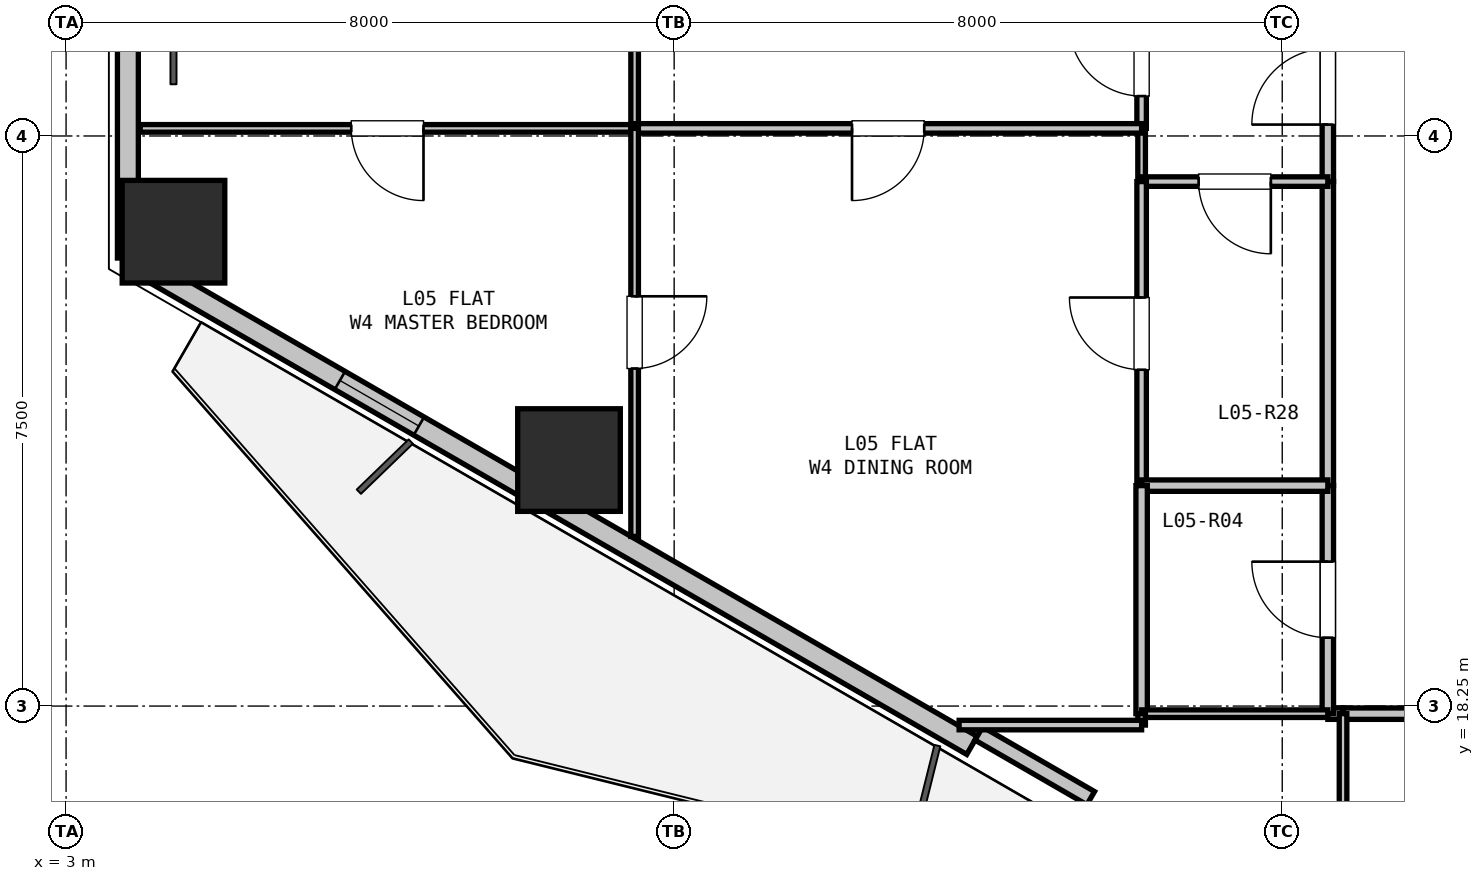
"""IFC4 building model, lengths in metres.
Left out: names, types, materials, properties, quantities, classifications, styles, units other than length and angle.
Written with IfcOpenShell. Run it as: python <this file> out.ifc"""

import sys

from ifc_helpers import new_model, si_unit, direction, frame, frame_2d, origin, origin_2d, place, context, subcontext, project, spatial, rectangle, hollow_rectangle, extrude, element, fill, save


model = new_model("IFC4")
c1 = context("Model", 3, precision=1e-05, world=origin(), true_north=direction((0.0, 1.0)))
c2 = subcontext(c1, "Body", "Model", "MODEL_VIEW")
j1 = project(units=[si_unit("LENGTHUNIT", "METRE"), si_unit("PLANEANGLEUNIT", "RADIAN")], contexts=[c1])
p1 = place(None, origin())
s1 = spatial("IfcSite", under=j1, at=p1, CompositionType="ELEMENT")
p2 = place(p1, origin())
s2 = spatial("IfcBuilding", under=s1, at=p2, CompositionType="ELEMENT")
p3 = place(p2, frame((0.0, 0.0, 22.5)))
s3 = spatial("IfcBuildingStorey", under=s2, at=p3, CompositionType="ELEMENT", Elevation=22.5)
for number, where, z_axis, x_axis in (
    (1, (9.617, 21.486, 0.0), (0.0, 0.0, 1.0), (1.0, 0.0, 0.0)),
    (2, (4.413, 24.491, 0.0), (0.0, 0.0, 1.0), (1.0, 0.0, 0.0)),
):
    element("IfcColumn", number, at=place(p3, frame(where, z_axis=z_axis, x_axis=x_axis)), inside=s3, PredefinedType="COLUMN", context=c2, shape_type="SweptSolid", body=[
        extrude(hollow_rectangle(XDim=1.35, YDim=1.35, WallThickness=0.036, at=origin_2d()), origin(), (0.0, 0.0, 1.0), 3.3),
    ])
p4 = place(p3, frame((3.813, 24.144, 0.0), z_axis=(0.0, 0.0, 1.0), x_axis=(0.0, 1.0, 0.0)))
e3 = element("IfcWall", 3, at=p4, inside=s3, PredefinedType="SOLIDWALL", context=c2, shape_type="SweptSolid", body=[
    extrude(rectangle(XDim=5.211, YDim=0.275, at=frame_2d((2.606, 0.0))), origin(), (0.0, 0.0, 1.0), 2.66),
])
p5 = place(p3, frame((14.918, 17.733, 0.0), z_axis=(0.0, 0.0, 1.0), x_axis=(-0.866027105532, 0.499997052475, 0.0)))
e4 = element("IfcWall", 4, at=p5, inside=s3, PredefinedType="SOLIDWALL", context=c2, shape_type="SweptSolid", body=[
    extrude(rectangle(XDim=12.673, YDim=0.275, at=frame_2d((6.336, 0.0))), origin(), (0.0, 0.0, 1.0), 2.66),
])
p6 = place(p5, frame((8.402, 0.0, 0.9)))
e5 = element("IfcOpeningElement", 5, at=p6, cuts=e4, PredefinedType="OPENING", context=c2, shape_type="SweptSolid", body=[
    extrude(rectangle(XDim=1.2, YDim=1.4, at=frame_2d((0.6, 0.7))), frame((0.0, 0.147, 0.0), z_axis=(0.0, -1.0, 0.0), x_axis=(1.0, 0.0, 0.0)), (0.0, 0.0, 1.0), 0.295),
])
p7 = place(p3, frame((16.48, 17.039, 0.0), z_axis=(0.0, 0.0, 1.0), x_axis=(-0.86605165483, 0.499954529098, 0.0)))
e6 = element("IfcWall", 6, at=p7, inside=s3, PredefinedType="PARAPET", context=c2, shape_type="SweptSolid", body=[
    extrude(rectangle(XDim=1.7, YDim=0.2, at=frame_2d((0.85, 0.0))), origin(), (0.0, 0.0, 1.0), 2.66),
])
p8 = place(p3, frame((22.6, 18.15, 0.0), z_axis=(0.0, 0.0, 1.0), x_axis=(-1.0, 0.0, 0.0)))
e7 = element("IfcWall", 7, at=p8, inside=s3, PredefinedType="PARTITIONING", context=c2, shape_type="SweptSolid", body=[
    extrude(rectangle(XDim=2.8, YDim=0.15, at=frame_2d((1.4, 0.0))), origin(), (0.0, 0.0, 1.0), 3.04),
])
p9 = place(p8, frame((0.9, 0.0, 0.0)))
e8 = element("IfcOpeningElement", 8, at=p9, cuts=e7, PredefinedType="OPENING", context=c2, shape_type="SweptSolid", body=[
    extrude(rectangle(XDim=1.0, YDim=2.15, at=frame_2d((0.5, 1.075))), frame((0.0, 0.085, 0.0), z_axis=(0.0, -1.0, 0.0), x_axis=(1.0, 0.0, 0.0)), (0.0, 0.0, 1.0), 0.17),
])
p10 = place(p3, frame((19.8, 18.15, 0.0), z_axis=(0.0, 0.0, 1.0), x_axis=(-1.0, 0.0, 0.0)))
e9 = element("IfcWall", 9, at=p10, inside=s3, PredefinedType="PARTITIONING", context=c2, shape_type="SweptSolid", body=[
    extrude(rectangle(XDim=0.2, YDim=0.15, at=frame_2d((0.1, 0.0))), origin(), (0.0, 0.0, 1.0), 3.04),
])
p11 = place(p3, frame((19.6, 18.15, 0.0), z_axis=(0.0, 0.0, 1.0), x_axis=(0.0, 1.0, 0.0)))
e10 = element("IfcWall", 10, at=p11, inside=s3, PredefinedType="PARTITIONING", context=c2, shape_type="SweptSolid", body=[
    extrude(rectangle(XDim=3.0, YDim=0.15, at=frame_2d((1.5, 0.0))), origin(), (0.0, 0.0, 1.0), 2.337),
])
p12 = place(p11, frame((1.0, 0.0, 0.0)))
e11 = element("IfcOpeningElement", 11, at=p12, cuts=e10, PredefinedType="OPENING", context=c2, shape_type="SweptSolid", body=[
    extrude(rectangle(XDim=1.0, YDim=2.15, at=frame_2d((0.5, 1.075))), frame((0.0, 0.085, 0.0), z_axis=(0.0, -1.0, 0.0), x_axis=(1.0, 0.0, 0.0)), (0.0, 0.0, 1.0), 0.17),
])
p13 = place(p3, frame((19.6, 21.15, 0.0), z_axis=(0.0, 0.0, 1.0), x_axis=(0.0, 1.0, 0.0)))
e12 = element("IfcWall", 12, at=p13, inside=s3, PredefinedType="PARTITIONING", context=c2, shape_type="SweptSolid", body=[
    extrude(rectangle(XDim=4.0, YDim=0.15, at=frame_2d((2.0, 0.0))), origin(), (0.0, 0.0, 1.0), 3.04),
])
p14 = place(p3, frame((19.6, 25.15, 0.0), z_axis=(0.0, 0.0, 1.0), x_axis=(0.0, 1.0, 0.0)))
e13 = element("IfcWall", 13, at=p14, inside=s3, PredefinedType="PARTITIONING", context=c2, shape_type="SweptSolid", body=[
    extrude(rectangle(XDim=2.5, YDim=0.15, at=frame_2d((1.25, 0.0))), origin(), (0.0, 0.0, 1.0), 3.04),
])
p15 = place(p14, frame((0.75, 0.0, 0.0)))
e14 = element("IfcOpeningElement", 14, at=p15, cuts=e13, PredefinedType="OPENING", context=c2, shape_type="SweptSolid", body=[
    extrude(rectangle(XDim=1.0, YDim=2.15, at=frame_2d((0.5, 1.075))), frame((0.0, 0.085, 0.0), z_axis=(0.0, -1.0, 0.0), x_axis=(1.0, 0.0, 0.0)), (0.0, 0.0, 1.0), 0.17),
])
p16 = place(p3, frame((17.15, 25.15, 0.0), z_axis=(0.0, 0.0, 1.0), x_axis=(0.0, 1.0, 0.0)))
e15 = element("IfcWall", 15, at=p16, inside=s3, PredefinedType="PARTITIONING", context=c2, shape_type="SweptSolid", body=[
    extrude(rectangle(XDim=0.7, YDim=0.1, at=frame_2d((0.35, 0.0))), origin(), (0.0, 0.0, 1.0), 3.04),
])
p17 = place(p3, frame((17.15, 25.85, 0.0), z_axis=(0.0, 0.0, 1.0), x_axis=(0.0, 1.0, 0.0)))
e16 = element("IfcWall", 16, at=p17, inside=s3, PredefinedType="PARTITIONING", context=c2, shape_type="SweptSolid", body=[
    extrude(rectangle(XDim=1.8, YDim=0.125, at=frame_2d((0.9, 0.0))), origin(), (0.0, 0.0, 1.0), 3.04),
])
p18 = place(p17, frame((0.425, 0.0, 0.0)))
e17 = element("IfcOpeningElement", 17, at=p18, cuts=e16, PredefinedType="OPENING", context=c2, shape_type="SweptSolid", body=[
    extrude(rectangle(XDim=0.95, YDim=2.1, at=frame_2d((0.475, 1.05))), frame((0.0, 0.073, 0.0), z_axis=(0.0, -1.0, 0.0), x_axis=(1.0, 0.0, 0.0)), (0.0, 0.0, 1.0), 0.145),
])
p19 = place(p3, frame((19.6, 25.15, 0.0), z_axis=(0.0, 0.0, 1.0), x_axis=(-1.0, 0.0, 0.0)))
e18 = element("IfcWall", 18, at=p19, inside=s3, PredefinedType="PARTITIONING", context=c2, shape_type="SweptSolid", body=[
    extrude(rectangle(XDim=2.45, YDim=0.125, at=frame_2d((1.225, 0.0))), origin(), (0.0, 0.0, 1.0), 3.04),
])
p20 = place(p19, frame((0.75, 0.0, 0.0)))
e19 = element("IfcOpeningElement", 19, at=p20, cuts=e18, PredefinedType="OPENING", context=c2, shape_type="SweptSolid", body=[
    extrude(rectangle(XDim=0.95, YDim=2.1, at=frame_2d((0.475, 1.05))), frame((0.0, 0.073, 0.0), z_axis=(0.0, -1.0, 0.0), x_axis=(1.0, 0.0, 0.0)), (0.0, 0.0, 1.0), 0.145),
])
p21 = place(p3, frame((17.15, 21.15, 0.0), z_axis=(0.0, 0.0, 1.0), x_axis=(0.0, 1.0, 0.0)))
e20 = element("IfcWall", 20, at=p21, inside=s3, PredefinedType="PARTITIONING", context=c2, shape_type="SweptSolid", body=[
    extrude(rectangle(XDim=4.0, YDim=0.125, at=frame_2d((2.0, 0.0))), origin(), (0.0, 0.0, 1.0), 2.337),
])
p22 = place(p21, frame((1.525, 0.0, 0.0)))
e21 = element("IfcOpeningElement", 21, at=p22, cuts=e20, PredefinedType="OPENING", context=c2, shape_type="SweptSolid", body=[
    extrude(rectangle(XDim=0.95, YDim=2.1, at=frame_2d((0.475, 1.05))), frame((0.0, 0.073, 0.0), z_axis=(0.0, -1.0, 0.0), x_axis=(1.0, 0.0, 0.0)), (0.0, 0.0, 1.0), 0.145),
])
p23 = place(p3, frame((19.6, 21.15, 0.0), z_axis=(0.0, 0.0, 1.0), x_axis=(-1.0, 0.0, 0.0)))
e22 = element("IfcWall", 22, at=p23, inside=s3, PredefinedType="PARTITIONING", context=c2, shape_type="SweptSolid", body=[
    extrude(rectangle(XDim=2.45, YDim=0.15, at=frame_2d((1.225, 0.0))), origin(), (0.0, 0.0, 1.0), 2.337),
])
p24 = place(p3, frame((17.15, 18.15, 0.0), z_axis=(0.0, 0.0, 1.0), x_axis=(0.0, 1.0, 0.0)))
e23 = element("IfcWall", 23, at=p24, inside=s3, PredefinedType="PARTITIONING", context=c2, shape_type="SweptSolid", body=[
    extrude(rectangle(XDim=3.0, YDim=0.15, at=frame_2d((1.5, 0.0))), origin(), (0.0, 0.0, 1.0), 3.04),
])
p25 = place(p3, frame((19.6, 18.15, 0.0), z_axis=(0.0, 0.0, 1.0), x_axis=(-1.0, 0.0, 0.0)))
e24 = element("IfcWall", 24, at=p25, inside=s3, PredefinedType="PARTITIONING", context=c2, shape_type="SweptSolid", body=[
    extrude(rectangle(XDim=2.45, YDim=0.1, at=frame_2d((1.225, 0.0))), origin(), (0.0, 0.0, 1.0), 3.04),
])
p26 = place(p3, frame((19.8, 14.956, 0.0), z_axis=(0.0, 0.0, 1.0), x_axis=(0.0, 1.0, 0.0)))
e25 = element("IfcWall", 25, at=p26, inside=s3, PredefinedType="PARTITIONING", context=c2, shape_type="SweptSolid", body=[
    extrude(rectangle(XDim=3.194, YDim=0.1, at=frame_2d((1.597, 0.0))), origin(), (0.0, 0.0, 1.0), 2.365),
])
p27 = place(p3, frame((10.48, 25.85, 0.0), z_axis=(0.0, 0.0, 1.0), x_axis=(-1.0, 0.0, 0.0)))
e26 = element("IfcWall", 26, at=p27, inside=s3, PredefinedType="PARTITIONING", context=c2, shape_type="SweptSolid", body=[
    extrude(rectangle(XDim=6.505, YDim=0.1, at=frame_2d((3.253, 0.0))), origin(), (0.0, 0.0, 1.0), 2.65),
])
p28 = place(p27, frame((2.778, 0.0, 0.0)))
e27 = element("IfcOpeningElement", 27, at=p28, cuts=e26, PredefinedType="OPENING", context=c2, shape_type="SweptSolid", body=[
    extrude(rectangle(XDim=0.95, YDim=2.1, at=frame_2d((0.475, 1.05))), frame((0.0, 0.06, 0.0), z_axis=(0.0, -1.0, 0.0), x_axis=(1.0, 0.0, 0.0)), (0.0, 0.0, 1.0), 0.12),
])
p29 = place(p3, frame((10.48, 33.018, 0.0), z_axis=(0.0, 0.0, 1.0), x_axis=(0.0, -1.0, 0.0)))
e28 = element("IfcWall", 28, at=p29, inside=s3, PredefinedType="PARTITIONING", context=c2, shape_type="SweptSolid", body=[
    extrude(rectangle(XDim=7.168, YDim=0.1, at=frame_2d((3.584, 0.0))), origin(), (0.0, 0.0, 1.0), 2.337),
])
p30 = place(p29, frame((3.109, 0.0, 0.0)))
e29 = element("IfcOpeningElement", 29, at=p30, cuts=e28, PredefinedType="OPENING", context=c2, shape_type="SweptSolid", body=[
    extrude(rectangle(XDim=0.95, YDim=2.1, at=frame_2d((0.475, 1.05))), frame((0.0, 0.06, 0.0), z_axis=(0.0, -1.0, 0.0), x_axis=(1.0, 0.0, 0.0)), (0.0, 0.0, 1.0), 0.12),
])
p31 = place(p3, frame((17.15, 25.85, 0.0), z_axis=(0.0, 0.0, 1.0), x_axis=(-1.0, 0.0, 0.0)))
e30 = element("IfcWall", 30, at=p31, inside=s3, PredefinedType="PARTITIONING", context=c2, shape_type="SweptSolid", body=[
    extrude(rectangle(XDim=6.67, YDim=0.125, at=frame_2d((3.335, 0.0))), origin(), (0.0, 0.0, 1.0), 3.04),
])
p32 = place(p31, frame((2.86, 0.0, 0.0)))
e31 = element("IfcOpeningElement", 31, at=p32, cuts=e30, PredefinedType="OPENING", context=c2, shape_type="SweptSolid", body=[
    extrude(rectangle(XDim=0.95, YDim=2.1, at=frame_2d((0.475, 1.05))), frame((0.0, 0.073, 0.0), z_axis=(0.0, -1.0, 0.0), x_axis=(1.0, 0.0, 0.0)), (0.0, 0.0, 1.0), 0.145),
])
p33 = place(p3, frame((10.48, 25.85, 0.0), z_axis=(0.0, 0.0, 1.0), x_axis=(0.0, -1.0, 0.0)))
e32 = element("IfcWall", 32, at=p33, inside=s3, PredefinedType="PARTITIONING", context=c2, shape_type="SweptSolid", body=[
    extrude(rectangle(XDim=5.368, YDim=0.1, at=frame_2d((2.684, 0.0))), origin(), (0.0, 0.0, 1.0), 2.337),
])
p34 = place(p33, frame((2.209, 0.0, 0.0)))
e33 = element("IfcOpeningElement", 33, at=p34, cuts=e32, PredefinedType="OPENING", context=c2, shape_type="SweptSolid", body=[
    extrude(rectangle(XDim=0.95, YDim=2.1, at=frame_2d((0.475, 1.05))), frame((0.0, 0.06, 0.0), z_axis=(0.0, -1.0, 0.0), x_axis=(1.0, 0.0, 0.0)), (0.0, 0.0, 1.0), 0.12),
])
p35 = place(p3, frame((3.943, 24.069, 0.0), z_axis=(0.0, 0.0, 1.0), x_axis=(-0.866131372301, 0.499816412211, 0.0)))
e34 = element("IfcWall", 34, at=p35, inside=s3, PredefinedType="PARTITIONING", context=c2, shape_type="SweptSolid", body=[
    extrude(rectangle(XDim=0.15, YDim=0.125, at=frame_2d((0.075, 0.0))), origin(), (0.0, 0.0, 1.0), 3.04),
])
p36 = place(p3, frame((17.15, 18.15, 0.0), z_axis=(0.0, 0.0, 1.0), x_axis=(0.0, -1.0, 0.0)))
e35 = element("IfcWall", 35, at=p36, inside=s3, PredefinedType="PARTITIONING", context=c2, shape_type="SweptSolid", body=[
    extrude(rectangle(XDim=0.15, YDim=0.1, at=frame_2d((0.075, 0.0))), origin(), (0.0, 0.0, 1.0), 3.04),
])
p37 = place(p3, frame((17.15, 18.0, 0.0), z_axis=(0.0, 0.0, 1.0), x_axis=(-1.0, 0.0, 0.0)))
e36 = element("IfcWall", 36, at=p37, inside=s3, PredefinedType="PARTITIONING", context=c2, shape_type="SweptSolid", body=[
    extrude(rectangle(XDim=2.401, YDim=0.125, at=frame_2d((1.2, 0.0))), origin(), (0.0, 0.0, 1.0), 2.365),
])
p38 = place(p6, origin())
e37 = element("IfcWindow", 37, at=p38, inside=s3, PartitioningType="SINGLE_PANEL", PredefinedType="WINDOW", context=c2, shape_type="SweptSolid", body=[
    extrude(rectangle(XDim=1.2, YDim=1.4, at=frame_2d((0.6, 0.7))), frame((0.0, 0.03, 0.0), z_axis=(0.0, -1.0, 0.0), x_axis=(1.0, 0.0, 0.0)), (0.0, 0.0, 1.0), 0.06),
])
fill(e5, e37)
p39 = place(p15, origin())
e38 = element("IfcDoor", 38, at=p39, inside=s3, OperationType="SINGLE_SWING_LEFT", PredefinedType="DOOR", context=c2, shape_type="SweptSolid", body=[
    extrude(rectangle(XDim=1.0, YDim=2.15, at=frame_2d((0.5, 1.075))), frame((0.0, 0.025, 0.0), z_axis=(0.0, -1.0, 0.0), x_axis=(1.0, 0.0, 0.0)), (0.0, 0.0, 1.0), 0.05),
])
fill(e14, e38)
p40 = place(p12, origin())
e39 = element("IfcDoor", 39, at=p40, inside=s3, OperationType="SINGLE_SWING_RIGHT", PredefinedType="DOOR", context=c2, shape_type="SweptSolid", body=[
    extrude(rectangle(XDim=1.0, YDim=2.15, at=frame_2d((0.5, 1.075))), frame((0.0, 0.025, 0.0), z_axis=(0.0, -1.0, 0.0), x_axis=(1.0, 0.0, 0.0)), (0.0, 0.0, 1.0), 0.05),
])
fill(e11, e39)
p41 = place(p20, origin())
e40 = element("IfcDoor", 40, at=p41, inside=s3, OperationType="SINGLE_SWING_LEFT", PredefinedType="DOOR", context=c2, shape_type="SweptSolid", body=[
    extrude(rectangle(XDim=0.95, YDim=2.1, at=frame_2d((0.475, 1.05))), frame((0.0, 0.025, 0.0), z_axis=(0.0, -1.0, 0.0), x_axis=(1.0, 0.0, 0.0)), (0.0, 0.0, 1.0), 0.05),
])
fill(e19, e40)
p42 = place(p18, origin())
e41 = element("IfcDoor", 41, at=p42, inside=s3, OperationType="SINGLE_SWING_RIGHT", PredefinedType="DOOR", context=c2, shape_type="SweptSolid", body=[
    extrude(rectangle(XDim=0.95, YDim=2.1, at=frame_2d((0.475, 1.05))), frame((0.0, 0.025, 0.0), z_axis=(0.0, -1.0, 0.0), x_axis=(1.0, 0.0, 0.0)), (0.0, 0.0, 1.0), 0.05),
])
fill(e17, e41)
p43 = place(p22, origin())
e42 = element("IfcDoor", 42, at=p43, inside=s3, OperationType="SINGLE_SWING_RIGHT", PredefinedType="DOOR", context=c2, shape_type="SweptSolid", body=[
    extrude(rectangle(XDim=0.95, YDim=2.1, at=frame_2d((0.475, 1.05))), frame((0.0, 0.025, 0.0), z_axis=(0.0, -1.0, 0.0), x_axis=(1.0, 0.0, 0.0)), (0.0, 0.0, 1.0), 0.05),
])
fill(e21, e42)
p44 = place(p28, origin())
e43 = element("IfcDoor", 43, at=p44, inside=s3, OperationType="SINGLE_SWING_LEFT", PredefinedType="DOOR", context=c2, shape_type="SweptSolid", body=[
    extrude(rectangle(XDim=0.95, YDim=2.1, at=frame_2d((0.475, 1.05))), frame((0.0, 0.025, 0.0), z_axis=(0.0, -1.0, 0.0), x_axis=(1.0, 0.0, 0.0)), (0.0, 0.0, 1.0), 0.05),
])
fill(e27, e43)
p45 = place(p32, origin())
e44 = element("IfcDoor", 44, at=p45, inside=s3, OperationType="SINGLE_SWING_RIGHT", PredefinedType="DOOR", context=c2, shape_type="SweptSolid", body=[
    extrude(rectangle(XDim=0.95, YDim=2.1, at=frame_2d((0.475, 1.05))), frame((0.0, 0.025, 0.0), z_axis=(0.0, -1.0, 0.0), x_axis=(1.0, 0.0, 0.0)), (0.0, 0.0, 1.0), 0.05),
])
fill(e31, e44)
p46 = place(p34, origin())
e45 = element("IfcDoor", 45, at=p46, inside=s3, OperationType="SINGLE_SWING_LEFT", PredefinedType="DOOR", context=c2, shape_type="SweptSolid", body=[
    extrude(rectangle(XDim=0.95, YDim=2.1, at=frame_2d((0.475, 1.05))), frame((0.0, 0.025, 0.0), z_axis=(0.0, -1.0, 0.0), x_axis=(1.0, 0.0, 0.0)), (0.0, 0.0, 1.0), 0.05),
])
fill(e33, e45)
save(model, sys.argv[1])
